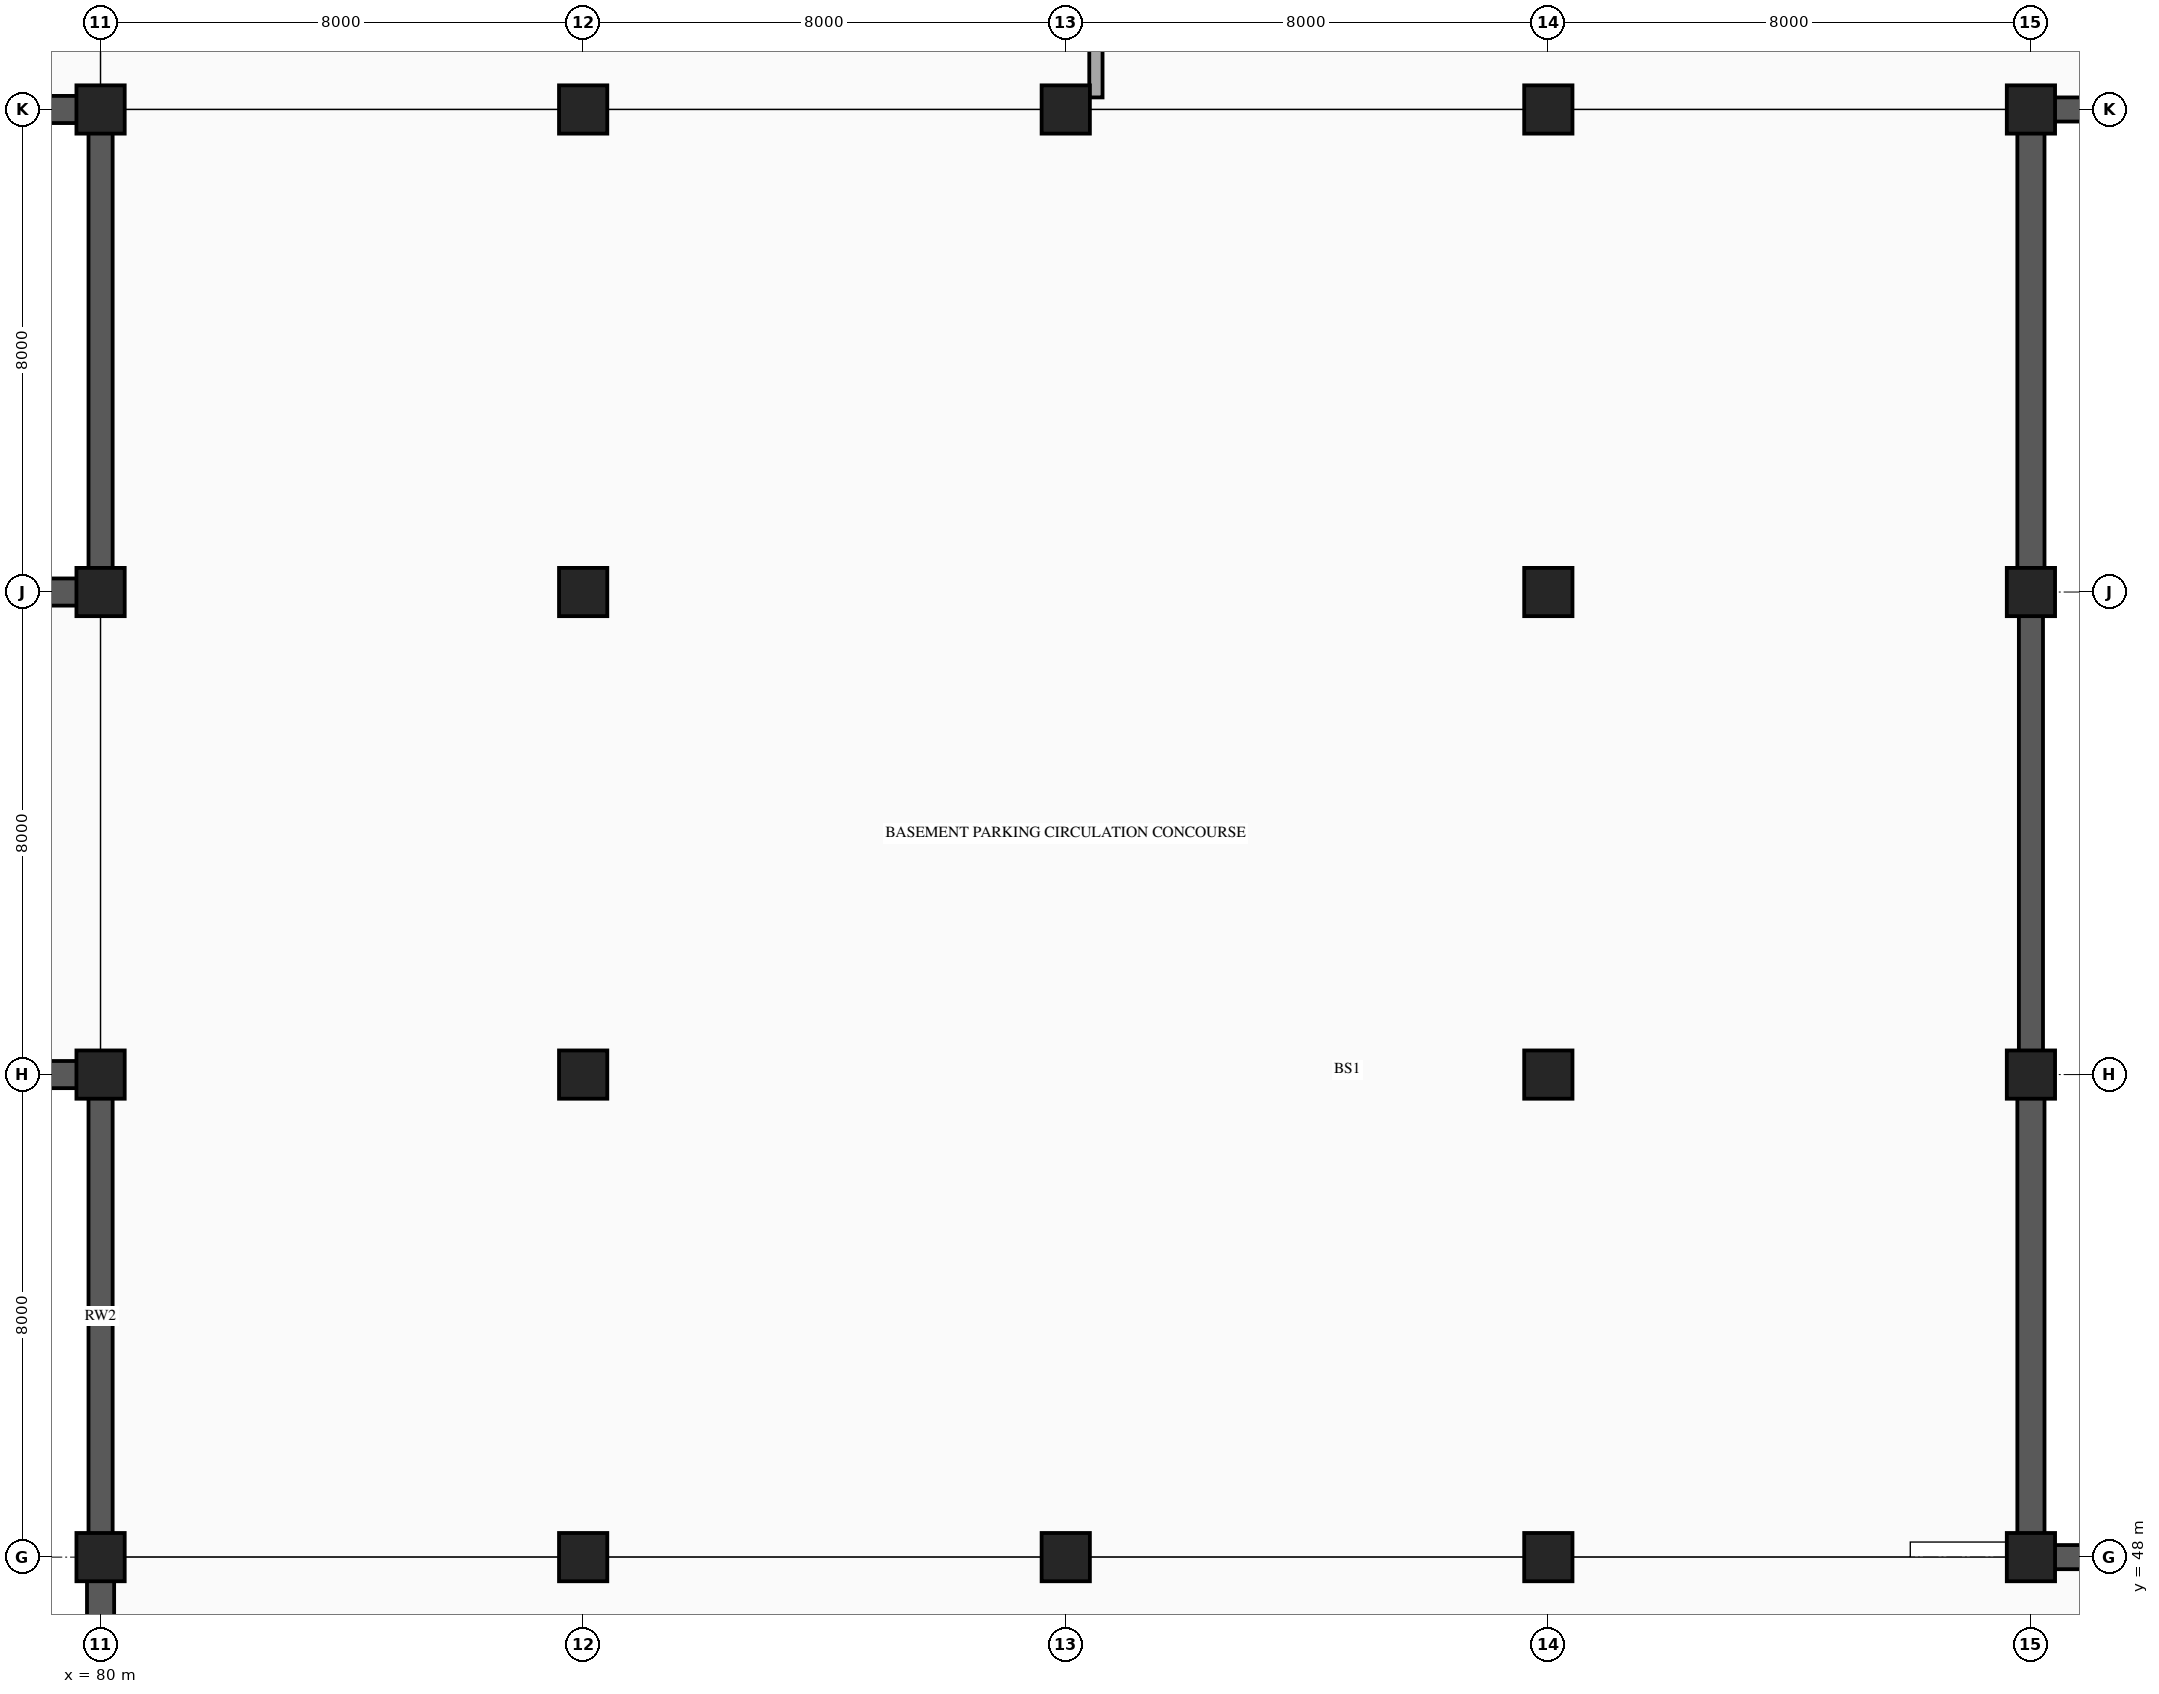
"""IFC4 building model, lengths in metres.
Left out: names, types, materials, properties, quantities, classifications, styles, units other than length and angle.
Written with IfcOpenShell. Run it as: python <this file> out.ifc"""

import sys

from ifc_helpers import new_model, si_unit, direction, frame, frame_2d, origin, origin_2d, place, context, subcontext, project, spatial, rectangle, circle, extrude, element, save


model = new_model("IFC4")
c1 = context("Model", 3, precision=1e-05, world=origin(), true_north=direction((0.0, 1.0)))
c2 = subcontext(c1, "Body", "Model", "MODEL_VIEW")
j1 = project(units=[si_unit("LENGTHUNIT", "METRE"), si_unit("PLANEANGLEUNIT", "RADIAN")], contexts=[c1])
p1 = place(None, origin())
s1 = spatial("IfcSite", under=j1, at=p1, CompositionType="ELEMENT")
p2 = place(p1, origin())
s2 = spatial("IfcBuilding", under=s1, at=p2, CompositionType="ELEMENT")
p3 = place(p2, frame((0.0, 0.0, -4.8)))
s3 = spatial("IfcBuildingStorey", under=s2, at=p3, CompositionType="ELEMENT", Elevation=-4.8)
p4 = place(p3, frame((80.0, 48.0, 0.0), z_axis=(0.0, 0.0, 1.0), x_axis=(1.0, 0.0, 0.0)))
e1 = element("IfcColumn", 1, at=p4, inside=s3, PredefinedType="COLUMN", context=c2, shape_type="SweptSolid", body=[
    extrude(circle(Radius=0.4, at=origin_2d()), origin(), (0.0, 0.0, 1.0), 4.8),
])
p5 = place(p3, frame((80.0, 56.0, 0.0), z_axis=(0.0, 0.0, 1.0), x_axis=(1.0, 0.0, 0.0)))
e2 = element("IfcColumn", 2, at=p5, inside=s3, PredefinedType="COLUMN", context=c2, shape_type="SweptSolid", body=[
    extrude(rectangle(XDim=0.8, YDim=0.8, at=origin_2d()), origin(), (0.0, 0.0, 1.0), 4.8),
])
p6 = place(p3, frame((80.0, 64.0, 0.0), z_axis=(0.0, 0.0, 1.0), x_axis=(1.0, 0.0, 0.0)))
e3 = element("IfcColumn", 3, at=p6, inside=s3, PredefinedType="COLUMN", context=c2, shape_type="SweptSolid", body=[
    extrude(circle(Radius=0.4, at=origin_2d()), origin(), (0.0, 0.0, 1.0), 4.8),
])
for number, where, z_axis, x_axis in (
    (4, (80.0, 72.0, 0.0), (0.0, 0.0, 1.0), (1.0, 0.0, 0.0)),
    (5, (88.0, 48.0, 0.0), (0.0, 0.0, 1.0), (1.0, 0.0, 0.0)),
):
    element("IfcColumn", number, at=place(p3, frame(where, z_axis=z_axis, x_axis=x_axis)), inside=s3, PredefinedType="COLUMN", context=c2, shape_type="SweptSolid", body=[
        extrude(rectangle(XDim=0.8, YDim=0.8, at=origin_2d()), origin(), (0.0, 0.0, 1.0), 4.8),
    ])
p7 = place(p3, frame((88.0, 56.0, 0.0), z_axis=(0.0, 0.0, 1.0), x_axis=(1.0, 0.0, 0.0)))
e6 = element("IfcColumn", 6, at=p7, inside=s3, PredefinedType="COLUMN", context=c2, shape_type="SweptSolid", body=[
    extrude(circle(Radius=0.4, at=origin_2d()), origin(), (0.0, 0.0, 1.0), 4.8),
])
p8 = place(p3, frame((88.0, 64.0, 0.0), z_axis=(0.0, 0.0, 1.0), x_axis=(1.0, 0.0, 0.0)))
e7 = element("IfcColumn", 7, at=p8, inside=s3, PredefinedType="COLUMN", context=c2, shape_type="SweptSolid", body=[
    extrude(rectangle(XDim=0.8, YDim=0.8, at=origin_2d()), origin(), (0.0, 0.0, 1.0), 4.8),
])
for number, where, z_axis, x_axis in (
    (8, (88.0, 72.0, 0.0), (0.0, 0.0, 1.0), (1.0, 0.0, 0.0)),
    (9, (96.0, 48.0, 0.0), (0.0, 0.0, 1.0), (1.0, 0.0, 0.0)),
):
    element("IfcColumn", number, at=place(p3, frame(where, z_axis=z_axis, x_axis=x_axis)), inside=s3, PredefinedType="COLUMN", context=c2, shape_type="SweptSolid", body=[
        extrude(circle(Radius=0.4, at=origin_2d()), origin(), (0.0, 0.0, 1.0), 4.8),
    ])
for number, where, z_axis, x_axis in (
    (10, (96.0, 72.0, 0.0), (0.0, 0.0, 1.0), (1.0, 0.0, 0.0)),
    (11, (104.0, 48.0, 0.0), (0.0, 0.0, 1.0), (1.0, 0.0, 0.0)),
):
    element("IfcColumn", number, at=place(p3, frame(where, z_axis=z_axis, x_axis=x_axis)), inside=s3, PredefinedType="COLUMN", context=c2, shape_type="SweptSolid", body=[
        extrude(rectangle(XDim=0.8, YDim=0.8, at=origin_2d()), origin(), (0.0, 0.0, 1.0), 4.8),
    ])
p9 = place(p3, frame((104.0, 56.0, 0.0), z_axis=(0.0, 0.0, 1.0), x_axis=(1.0, 0.0, 0.0)))
e12 = element("IfcColumn", 12, at=p9, inside=s3, PredefinedType="COLUMN", context=c2, shape_type="SweptSolid", body=[
    extrude(circle(Radius=0.4, at=origin_2d()), origin(), (0.0, 0.0, 1.0), 4.8),
])
p10 = place(p3, frame((104.0, 64.0, 0.0), z_axis=(0.0, 0.0, 1.0), x_axis=(1.0, 0.0, 0.0)))
e13 = element("IfcColumn", 13, at=p10, inside=s3, PredefinedType="COLUMN", context=c2, shape_type="SweptSolid", body=[
    extrude(rectangle(XDim=0.8, YDim=0.8, at=origin_2d()), origin(), (0.0, 0.0, 1.0), 4.8),
])
for number, where, z_axis, x_axis in (
    (14, (104.0, 72.0, 0.0), (0.0, 0.0, 1.0), (1.0, 0.0, 0.0)),
    (15, (112.0, 48.0, 0.0), (0.0, 0.0, 1.0), (1.0, 0.0, 0.0)),
):
    element("IfcColumn", number, at=place(p3, frame(where, z_axis=z_axis, x_axis=x_axis)), inside=s3, PredefinedType="COLUMN", context=c2, shape_type="SweptSolid", body=[
        extrude(circle(Radius=0.4, at=origin_2d()), origin(), (0.0, 0.0, 1.0), 4.8),
    ])
p11 = place(p3, frame((112.0, 56.0, 0.0), z_axis=(0.0, 0.0, 1.0), x_axis=(1.0, 0.0, 0.0)))
e16 = element("IfcColumn", 16, at=p11, inside=s3, PredefinedType="COLUMN", context=c2, shape_type="SweptSolid", body=[
    extrude(rectangle(XDim=0.8, YDim=0.8, at=origin_2d()), origin(), (0.0, 0.0, 1.0), 4.8),
])
p12 = place(p3, frame((112.0, 64.0, 0.0), z_axis=(0.0, 0.0, 1.0), x_axis=(1.0, 0.0, 0.0)))
e17 = element("IfcColumn", 17, at=p12, inside=s3, PredefinedType="COLUMN", context=c2, shape_type="SweptSolid", body=[
    extrude(circle(Radius=0.4, at=origin_2d()), origin(), (0.0, 0.0, 1.0), 4.8),
])
p13 = place(p3, frame((112.0, 72.0, 0.0), z_axis=(0.0, 0.0, 1.0), x_axis=(1.0, 0.0, 0.0)))
e18 = element("IfcColumn", 18, at=p13, inside=s3, PredefinedType="COLUMN", context=c2, shape_type="SweptSolid", body=[
    extrude(rectangle(XDim=0.8, YDim=0.8, at=origin_2d()), origin(), (0.0, 0.0, 1.0), 4.8),
])
p14 = place(p3, frame((80.0, 40.0, 0.0), z_axis=(0.0, 0.0, 1.0), x_axis=(0.0, 1.0, 0.0)))
e19 = element("IfcWall", 19, at=p14, inside=s3, PredefinedType="USERDEFINED", context=c2, shape_type="SweptSolid", body=[
    extrude(rectangle(XDim=8.0, YDim=0.45, at=frame_2d((4.0, 0.0))), origin(), (0.0, 0.0, 1.0), 4.5),
])
p15 = place(p3, frame((80.0, 48.0, 0.0), z_axis=(0.0, 0.0, 1.0), x_axis=(0.0, 1.0, 0.0)))
e20 = element("IfcWall", 20, at=p15, inside=s3, PredefinedType="USERDEFINED", context=c2, shape_type="SweptSolid", body=[
    extrude(rectangle(XDim=8.0, YDim=0.4, at=frame_2d((4.0, 0.0))), origin(), (0.0, 0.0, 1.0), 4.5),
])
for number, where, z_axis, x_axis in (
    (21, (80.0, 56.0, 0.0), (0.0, 0.0, 1.0), (-1.0, 0.0, 0.0)),
    (22, (72.0, 64.0, 0.0), (0.0, 0.0, 1.0), (1.0, 0.0, 0.0)),
):
    element("IfcWall", number, at=place(p3, frame(where, z_axis=z_axis, x_axis=x_axis)), inside=s3, PredefinedType="USERDEFINED", context=c2, shape_type="SweptSolid", body=[
        extrude(rectangle(XDim=8.0, YDim=0.45, at=frame_2d((4.0, 0.0))), origin(), (0.0, 0.0, 1.0), 4.5),
    ])
p16 = place(p3, frame((80.0, 64.0, 0.0), z_axis=(0.0, 0.0, 1.0), x_axis=(0.0, 1.0, 0.0)))
e23 = element("IfcWall", 23, at=p16, inside=s3, PredefinedType="USERDEFINED", context=c2, shape_type="SweptSolid", body=[
    extrude(rectangle(XDim=8.0, YDim=0.4, at=frame_2d((4.0, 0.0))), origin(), (0.0, 0.0, 1.0), 4.5),
])
p17 = place(p3, frame((80.0, 72.0, 0.0), z_axis=(0.0, 0.0, 1.0), x_axis=(-1.0, 0.0, 0.0)))
e24 = element("IfcWall", 24, at=p17, inside=s3, PredefinedType="USERDEFINED", context=c2, shape_type="SweptSolid", body=[
    extrude(rectangle(XDim=8.0, YDim=0.45, at=frame_2d((4.0, 0.0))), origin(), (0.0, 0.0, 1.0), 4.5),
])
p18 = place(p3, frame((120.0, 72.0, 0.0), z_axis=(0.0, 0.0, 1.0), x_axis=(-1.0, 0.0, 0.0)))
e25 = element("IfcWall", 25, at=p18, inside=s3, PredefinedType="USERDEFINED", context=c2, shape_type="SweptSolid", body=[
    extrude(rectangle(XDim=8.0, YDim=0.4, at=frame_2d((4.0, 0.0))), origin(), (0.0, 0.0, 1.0), 4.5),
])
p19 = place(p3, frame((112.0, 72.0, 0.0), z_axis=(0.0, 0.0, 1.0), x_axis=(0.0, -1.0, 0.0)))
e26 = element("IfcWall", 26, at=p19, inside=s3, PredefinedType="USERDEFINED", context=c2, shape_type="SweptSolid", body=[
    extrude(rectangle(XDim=8.0, YDim=0.45, at=frame_2d((4.0, 0.0))), origin(), (0.0, 0.0, 1.0), 4.5),
])
p20 = place(p3, frame((112.0, 64.0, 0.0), z_axis=(0.0, 0.0, 1.0), x_axis=(0.0, -1.0, 0.0)))
e27 = element("IfcWall", 27, at=p20, inside=s3, PredefinedType="USERDEFINED", context=c2, shape_type="SweptSolid", body=[
    extrude(rectangle(XDim=8.0, YDim=0.4, at=frame_2d((4.0, 0.0))), origin(), (0.0, 0.0, 1.0), 4.5),
])
p21 = place(p3, frame((112.0, 56.0, 0.0), z_axis=(0.0, 0.0, 1.0), x_axis=(0.0, -1.0, 0.0)))
e28 = element("IfcWall", 28, at=p21, inside=s3, PredefinedType="USERDEFINED", context=c2, shape_type="SweptSolid", body=[
    extrude(rectangle(XDim=8.0, YDim=0.45, at=frame_2d((4.0, 0.0))), origin(), (0.0, 0.0, 1.0), 4.5),
])
p22 = place(p3, frame((112.0, 48.0, 0.0), z_axis=(0.0, 0.0, 1.0), x_axis=(1.0, 0.0, 0.0)))
e29 = element("IfcWall", 29, at=p22, inside=s3, PredefinedType="USERDEFINED", context=c2, shape_type="SweptSolid", body=[
    extrude(rectangle(XDim=8.0, YDim=0.4, at=frame_2d((4.0, 0.0))), origin(), (0.0, 0.0, 1.0), 4.5),
])
p23 = place(p3, frame((96.5, 72.2, 0.0), z_axis=(0.0, 0.0, 1.0), x_axis=(0.0, 1.0, 0.0)))
e30 = element("IfcWall", 30, at=p23, inside=s3, PredefinedType="PARTITIONING", context=c2, shape_type="SweptSolid", body=[
    extrude(rectangle(XDim=31.7, YDim=0.22, at=frame_2d((15.85, 0.0))), origin(), (0.0, 0.0, 1.0), 3.78),
])
p24 = place(p23, frame((18.843, 0.0, 0.0)))
e31 = element("IfcOpeningElement", 31, at=p24, cuts=e30, PredefinedType="OPENING", context=c2, shape_type="SweptSolid", body=[
    extrude(rectangle(XDim=1.8, YDim=2.25, at=frame_2d((0.9, 1.125))), frame((0.0, 0.12, 0.0), z_axis=(0.0, -1.0, 0.0), x_axis=(1.0, 0.0, 0.0)), (0.0, 0.0, 1.0), 0.24),
])
save(model, sys.argv[1])
